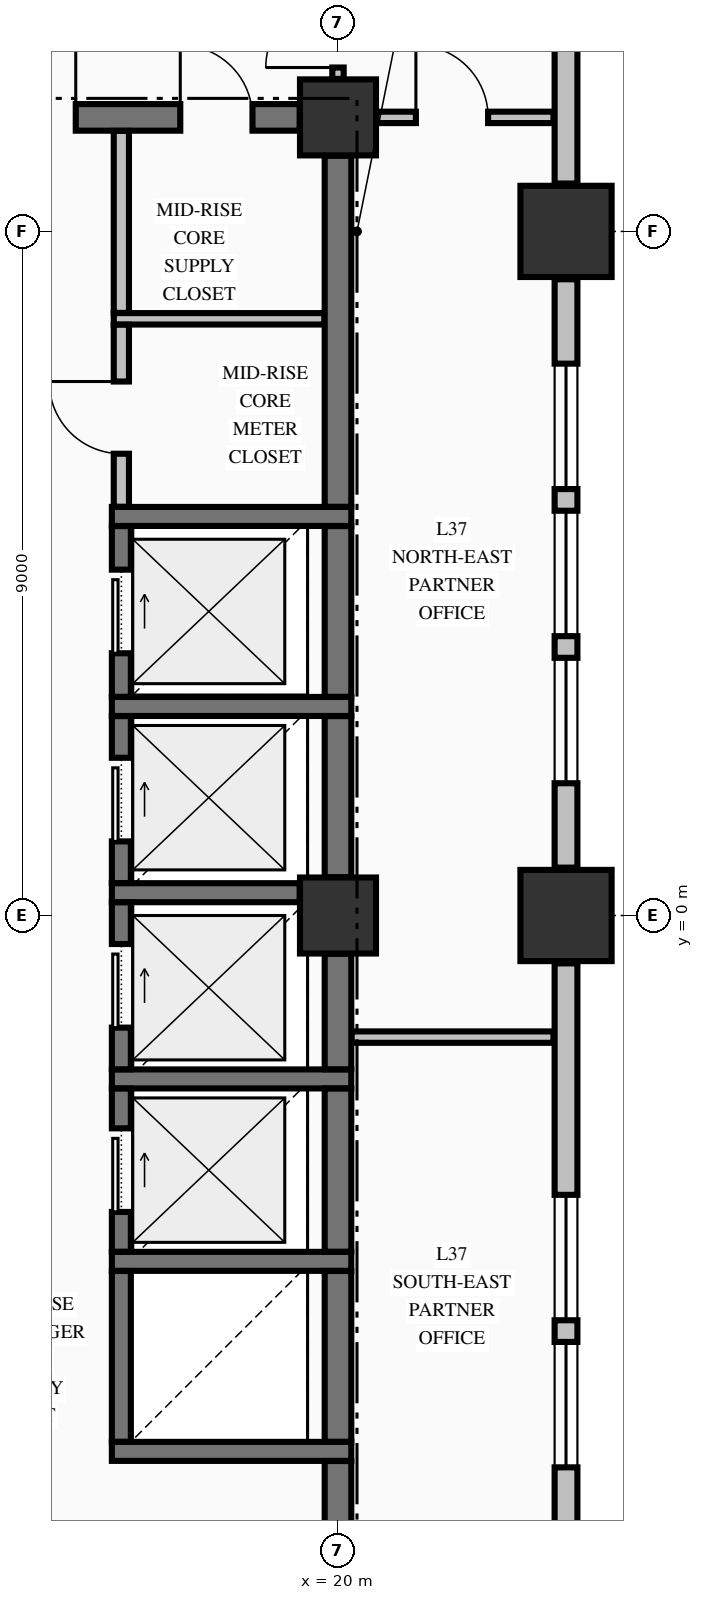
"""IFC4 building model, lengths in metres.
Left out: names, types, materials, properties, quantities, classifications, styles, units other than length and angle.
Written with IfcOpenShell. Run it as: python <this file> out.ifc"""

import sys

from ifc_helpers import new_model, si_unit, direction, frame, frame_2d, origin, origin_2d, place, context, subcontext, project, spatial, rectangle, extrude, element, fill, save


model = new_model("IFC4")
c1 = context("Model", 3, precision=1e-05, world=origin(), true_north=direction((0.0, 1.0)))
c2 = subcontext(c1, "Body", "Model", "MODEL_VIEW")
j1 = project(units=[si_unit("LENGTHUNIT", "METRE"), si_unit("PLANEANGLEUNIT", "RADIAN")], contexts=[c1])
p1 = place(None, origin())
s1 = spatial("IfcSite", under=j1, at=p1, CompositionType="ELEMENT")
p2 = place(p1, origin())
s2 = spatial("IfcBuilding", under=s1, at=p2, CompositionType="ELEMENT")
p3 = place(p2, frame((0.0, 0.0, 146.34)))
s3 = spatial("IfcBuildingStorey", under=s2, at=p3, CompositionType="ELEMENT", Elevation=146.34)
for number, where, z_axis, x_axis in (
    (1, (23.0, 0.0, -0.25), (0.0, 0.0, 1.0), (1.0, 0.0, 0.0)),
    (2, (23.0, 9.0, -0.25), (0.0, 0.0, 1.0), (1.0, 0.0, 0.0)),
):
    element("IfcColumn", number, at=place(p3, frame(where, z_axis=z_axis, x_axis=x_axis)), inside=s3, PredefinedType="COLUMN", context=c2, shape_type="SweptSolid", body=[
        extrude(rectangle(XDim=1.2, YDim=1.2, at=origin_2d()), origin(), (0.0, 0.0, 1.0), 3.57),
    ])
for number, where, z_axis, x_axis in (
    (3, (20.0, 10.5, -0.25), (0.0, 0.0, 1.0), (1.0, 0.0, 0.0)),
    (4, (20.0, 0.0, -0.25), (0.0, 0.0, 1.0), (1.0, 0.0, 0.0)),
):
    element("IfcColumn", number, at=place(p3, frame(where, z_axis=z_axis, x_axis=x_axis)), inside=s3, PredefinedType="COLUMN", context=c2, shape_type="SweptSolid", body=[
        extrude(rectangle(XDim=1.0, YDim=1.0, at=origin_2d()), origin(), (0.0, 0.0, 1.0), 3.57),
    ])
p4 = place(p3, frame((23.0, -8.37, 0.0), z_axis=(0.0, 0.0, 1.0), x_axis=(0.0, 1.0, 0.0)))
e5 = element("IfcWall", 5, at=p4, inside=s3, PredefinedType="STANDARD", context=c2, shape_type="SweptSolid", body=[
    extrude(rectangle(XDim=7.74, YDim=0.3, at=frame_2d((3.87, 0.0))), origin(), (0.0, 0.0, 1.0), 2.712),
])
p5 = place(p4, frame((1.11, 0.0, 0.8)))
e6 = element("IfcOpeningElement", 6, at=p5, cuts=e5, PredefinedType="OPENING", context=c2, shape_type="SweptSolid", body=[
    extrude(rectangle(XDim=1.65, YDim=1.7, at=frame_2d((0.825, 0.85))), frame((0.0, 0.16, 0.0), z_axis=(0.0, -1.0, 0.0), x_axis=(1.0, 0.0, 0.0)), (0.0, 0.0, 1.0), 0.32),
])
p6 = place(p4, frame((3.045, 0.0, 0.8)))
e7 = element("IfcOpeningElement", 7, at=p6, cuts=e5, PredefinedType="OPENING", context=c2, shape_type="SweptSolid", body=[
    extrude(rectangle(XDim=1.65, YDim=1.7, at=frame_2d((0.825, 0.85))), frame((0.0, 0.16, 0.0), z_axis=(0.0, -1.0, 0.0), x_axis=(1.0, 0.0, 0.0)), (0.0, 0.0, 1.0), 0.32),
])
p7 = place(p3, frame((23.0, 0.63, 0.0), z_axis=(0.0, 0.0, 1.0), x_axis=(0.0, 1.0, 0.0)))
e8 = element("IfcWall", 8, at=p7, inside=s3, PredefinedType="STANDARD", context=c2, shape_type="SweptSolid", body=[
    extrude(rectangle(XDim=7.74, YDim=0.3, at=frame_2d((3.87, 0.0))), origin(), (0.0, 0.0, 1.0), 2.712),
])
p8 = place(p7, frame((1.11, 0.0, 0.8)))
e9 = element("IfcOpeningElement", 9, at=p8, cuts=e8, PredefinedType="OPENING", context=c2, shape_type="SweptSolid", body=[
    extrude(rectangle(XDim=1.65, YDim=1.7, at=frame_2d((0.825, 0.85))), frame((0.0, 0.16, 0.0), z_axis=(0.0, -1.0, 0.0), x_axis=(1.0, 0.0, 0.0)), (0.0, 0.0, 1.0), 0.32),
])
p9 = place(p7, frame((3.045, 0.0, 0.8)))
e10 = element("IfcOpeningElement", 10, at=p9, cuts=e8, PredefinedType="OPENING", context=c2, shape_type="SweptSolid", body=[
    extrude(rectangle(XDim=1.65, YDim=1.7, at=frame_2d((0.825, 0.85))), frame((0.0, 0.16, 0.0), z_axis=(0.0, -1.0, 0.0), x_axis=(1.0, 0.0, 0.0)), (0.0, 0.0, 1.0), 0.32),
])
p10 = place(p7, frame((4.98, 0.0, 0.8)))
e11 = element("IfcOpeningElement", 11, at=p10, cuts=e8, PredefinedType="OPENING", context=c2, shape_type="SweptSolid", body=[
    extrude(rectangle(XDim=1.65, YDim=1.7, at=frame_2d((0.825, 0.85))), frame((0.0, 0.16, 0.0), z_axis=(0.0, -1.0, 0.0), x_axis=(1.0, 0.0, 0.0)), (0.0, 0.0, 1.0), 0.32),
])
p11 = place(p3, frame((23.0, 9.63, 0.0), z_axis=(0.0, 0.0, 1.0), x_axis=(0.0, 1.0, 0.0)))
e12 = element("IfcWall", 12, at=p11, inside=s3, PredefinedType="STANDARD", context=c2, shape_type="SweptSolid", body=[
    extrude(rectangle(XDim=10.74, YDim=0.3, at=frame_2d((5.37, 0.0))), origin(), (0.0, 0.0, 1.0), 2.712),
])
for number, where, z_axis, x_axis in (
    (13, (17.025, -7.05, 0.0), (0.0, 0.0, 1.0), (1.0, 0.0, 0.0)),
    (14, (17.025, -4.55, 0.0), (0.0, 0.0, 1.0), (1.0, 0.0, 0.0)),
    (15, (17.025, -2.15, 0.0), (0.0, 0.0, 1.0), (1.0, 0.0, 0.0)),
):
    element("IfcWall", number, at=place(p3, frame(where, z_axis=z_axis, x_axis=x_axis)), inside=s3, PredefinedType="SOLIDWALL", context=c2, shape_type="SweptSolid", body=[
        extrude(rectangle(XDim=3.15, YDim=0.25, at=frame_2d((1.575, 0.0))), origin(), (0.0, 0.0, 1.0), 3.32),
    ])
p12 = place(p3, frame((17.025, 0.3, 0.0), z_axis=(0.0, 0.0, 1.0), x_axis=(1.0, 0.0, 0.0)))
e16 = element("IfcWall", 16, at=p12, inside=s3, PredefinedType="SOLIDWALL", context=c2, shape_type="SweptSolid", body=[
    extrude(rectangle(XDim=2.471, YDim=0.25, at=frame_2d((1.236, 0.0))), origin(), (0.0, 0.0, 1.0), 3.32),
])
for number, where, z_axis, x_axis in (
    (17, (17.025, 2.75, 0.0), (0.0, 0.0, 1.0), (1.0, 0.0, 0.0)),
    (18, (17.025, 5.25, 0.0), (0.0, 0.0, 1.0), (1.0, 0.0, 0.0)),
):
    element("IfcWall", number, at=place(p3, frame(where, z_axis=z_axis, x_axis=x_axis)), inside=s3, PredefinedType="SOLIDWALL", context=c2, shape_type="SweptSolid", body=[
        extrude(rectangle(XDim=3.15, YDim=0.25, at=frame_2d((1.575, 0.0))), origin(), (0.0, 0.0, 1.0), 3.32),
    ])
p13 = place(p3, frame((14.7, 10.5, 0.0), z_axis=(0.0, 0.0, 1.0), x_axis=(1.0, 0.0, 0.0)))
e19 = element("IfcWall", 19, at=p13, inside=s3, PredefinedType="SHEAR", context=c2, shape_type="SweptSolid", body=[
    extrude(rectangle(XDim=4.796, YDim=0.35, at=frame_2d((2.398, 0.0))), origin(), (0.0, 0.0, 1.0), 3.32),
])
p14 = place(p13, frame((0.65, 0.0, 0.0)))
e20 = element("IfcOpeningElement", 20, at=p14, cuts=e19, PredefinedType="OPENING", context=c2, shape_type="SweptSolid", body=[
    extrude(rectangle(XDim=1.2, YDim=2.15, at=frame_2d((0.6, 1.075))), frame((0.0, 0.185, 0.0), z_axis=(0.0, -1.0, 0.0), x_axis=(1.0, 0.0, 0.0)), (0.0, 0.0, 1.0), 0.37),
])
p15 = place(p13, frame((3.225, 0.0, 0.0)))
e21 = element("IfcOpeningElement", 21, at=p15, cuts=e19, PredefinedType="OPENING", context=c2, shape_type="SweptSolid", body=[
    extrude(rectangle(XDim=0.95, YDim=2.15, at=frame_2d((0.475, 1.075))), frame((0.0, 0.185, 0.0), z_axis=(0.0, -1.0, 0.0), x_axis=(1.0, 0.0, 0.0)), (0.0, 0.0, 1.0), 0.37),
])
p16 = place(p3, frame((20.178, -1.6, 0.0), z_axis=(0.0, 0.0, 1.0), x_axis=(1.0, 0.0, 0.0)))
e22 = element("IfcWall", 22, at=p16, inside=s3, PredefinedType="PARTITIONING", context=c2, shape_type="SweptSolid", body=[
    extrude(rectangle(XDim=2.657, YDim=0.15, at=frame_2d((1.329, 0.0))), origin(), (0.0, 0.0, 1.0), 3.32),
])
p17 = place(p3, frame((17.05, 7.85, 0.0), z_axis=(0.0, 0.0, 1.0), x_axis=(1.0, 0.0, 0.0)))
e23 = element("IfcWall", 23, at=p17, inside=s3, PredefinedType="PARTITIONING", context=c2, shape_type="SweptSolid", body=[
    extrude(rectangle(XDim=2.772, YDim=0.15, at=frame_2d((1.386, 0.0))), origin(), (0.0, 0.0, 1.0), 3.32),
])
p18 = place(p3, frame((20.506, 10.5, 0.0), z_axis=(0.0, 0.0, 1.0), x_axis=(1.0, 0.0, 0.0)))
e24 = element("IfcWall", 24, at=p18, inside=s3, PredefinedType="PARTITIONING", context=c2, shape_type="SweptSolid", body=[
    extrude(rectangle(XDim=2.329, YDim=0.15, at=frame_2d((1.165, 0.0))), origin(), (0.0, 0.0, 1.0), 3.32),
])
p19 = place(p18, frame((0.519, 0.0, 0.0)))
e25 = element("IfcOpeningElement", 25, at=p19, cuts=e24, PredefinedType="OPENING", context=c2, shape_type="SweptSolid", body=[
    extrude(rectangle(XDim=0.95, YDim=2.15, at=frame_2d((0.475, 1.075))), frame((0.0, 0.085, 0.0), z_axis=(0.0, -1.0, 0.0), x_axis=(1.0, 0.0, 0.0)), (0.0, 0.0, 1.0), 0.17),
])
p20 = place(p3, frame((17.15, -6.923, 0.0), z_axis=(0.0, 0.0, 1.0), x_axis=(0.0, 1.0, 0.0)))
e26 = element("IfcWall", 26, at=p20, inside=s3, PredefinedType="SOLIDWALL", context=c2, shape_type="SweptSolid", body=[
    extrude(rectangle(XDim=2.246, YDim=0.25, at=frame_2d((1.123, 0.0))), origin(), (0.0, 0.0, 1.0), 3.32),
])
p21 = place(p3, frame((17.15, -4.423, 0.0), z_axis=(0.0, 0.0, 1.0), x_axis=(0.0, 1.0, 0.0)))
e27 = element("IfcWall", 27, at=p21, inside=s3, PredefinedType="SOLIDWALL", context=c2, shape_type="SweptSolid", body=[
    extrude(rectangle(XDim=2.146, YDim=0.25, at=frame_2d((1.073, 0.0))), origin(), (0.0, 0.0, 1.0), 3.32),
])
p22 = place(p21, frame((0.523, 0.0, 0.0)))
e28 = element("IfcOpeningElement", 28, at=p22, cuts=e27, PredefinedType="OPENING", context=c2, shape_type="SweptSolid", body=[
    extrude(rectangle(XDim=1.1, YDim=2.2, at=frame_2d((0.55, 1.1))), frame((0.0, 0.135, 0.0), z_axis=(0.0, -1.0, 0.0), x_axis=(1.0, 0.0, 0.0)), (0.0, 0.0, 1.0), 0.27),
])
p23 = place(p3, frame((17.15, -2.023, 0.0), z_axis=(0.0, 0.0, 1.0), x_axis=(0.0, 1.0, 0.0)))
e29 = element("IfcWall", 29, at=p23, inside=s3, PredefinedType="SOLIDWALL", context=c2, shape_type="SweptSolid", body=[
    extrude(rectangle(XDim=2.196, YDim=0.25, at=frame_2d((1.098, 0.0))), origin(), (0.0, 0.0, 1.0), 3.32),
])
p24 = place(p23, frame((0.548, 0.0, 0.0)))
e30 = element("IfcOpeningElement", 30, at=p24, cuts=e29, PredefinedType="OPENING", context=c2, shape_type="SweptSolid", body=[
    extrude(rectangle(XDim=1.1, YDim=2.2, at=frame_2d((0.55, 1.1))), frame((0.0, 0.135, 0.0), z_axis=(0.0, -1.0, 0.0), x_axis=(1.0, 0.0, 0.0)), (0.0, 0.0, 1.0), 0.27),
])
p25 = place(p3, frame((17.15, 0.427, 0.0), z_axis=(0.0, 0.0, 1.0), x_axis=(0.0, 1.0, 0.0)))
e31 = element("IfcWall", 31, at=p25, inside=s3, PredefinedType="SOLIDWALL", context=c2, shape_type="SweptSolid", body=[
    extrude(rectangle(XDim=2.196, YDim=0.25, at=frame_2d((1.098, 0.0))), origin(), (0.0, 0.0, 1.0), 3.32),
])
p26 = place(p25, frame((0.548, 0.0, 0.0)))
e32 = element("IfcOpeningElement", 32, at=p26, cuts=e31, PredefinedType="OPENING", context=c2, shape_type="SweptSolid", body=[
    extrude(rectangle(XDim=1.1, YDim=2.2, at=frame_2d((0.55, 1.1))), frame((0.0, 0.135, 0.0), z_axis=(0.0, -1.0, 0.0), x_axis=(1.0, 0.0, 0.0)), (0.0, 0.0, 1.0), 0.27),
])
p27 = place(p3, frame((17.15, 2.877, 0.0), z_axis=(0.0, 0.0, 1.0), x_axis=(0.0, 1.0, 0.0)))
e33 = element("IfcWall", 33, at=p27, inside=s3, PredefinedType="SOLIDWALL", context=c2, shape_type="SweptSolid", body=[
    extrude(rectangle(XDim=2.246, YDim=0.25, at=frame_2d((1.123, 0.0))), origin(), (0.0, 0.0, 1.0), 3.32),
])
p28 = place(p27, frame((0.573, 0.0, 0.0)))
e34 = element("IfcOpeningElement", 34, at=p28, cuts=e33, PredefinedType="OPENING", context=c2, shape_type="SweptSolid", body=[
    extrude(rectangle(XDim=1.1, YDim=2.2, at=frame_2d((0.55, 1.1))), frame((0.0, 0.135, 0.0), z_axis=(0.0, -1.0, 0.0), x_axis=(1.0, 0.0, 0.0)), (0.0, 0.0, 1.0), 0.27),
])
p29 = place(p3, frame((20.0, -9.446, 0.0), z_axis=(0.0, 0.0, 1.0), x_axis=(0.0, 1.0, 0.0)))
e35 = element("IfcWall", 35, at=p29, inside=s3, PredefinedType="SHEAR", context=c2, shape_type="SweptSolid", body=[
    extrude(rectangle(XDim=2.269, YDim=0.35, at=frame_2d((1.135, 0.0))), origin(), (0.0, 0.0, 1.0), 3.32),
])
p30 = place(p3, frame((20.0, -6.923, 0.0), z_axis=(0.0, 0.0, 1.0), x_axis=(0.0, 1.0, 0.0)))
e36 = element("IfcWall", 36, at=p30, inside=s3, PredefinedType="SHEAR", context=c2, shape_type="SweptSolid", body=[
    extrude(rectangle(XDim=2.246, YDim=0.35, at=frame_2d((1.123, 0.0))), origin(), (0.0, 0.0, 1.0), 3.32),
])
p31 = place(p3, frame((20.0, -4.423, 0.0), z_axis=(0.0, 0.0, 1.0), x_axis=(0.0, 1.0, 0.0)))
e37 = element("IfcWall", 37, at=p31, inside=s3, PredefinedType="SHEAR", context=c2, shape_type="SweptSolid", body=[
    extrude(rectangle(XDim=2.146, YDim=0.35, at=frame_2d((1.073, 0.0))), origin(), (0.0, 0.0, 1.0), 3.32),
])
p32 = place(p3, frame((20.0, -2.023, 0.0), z_axis=(0.0, 0.0, 1.0), x_axis=(0.0, 1.0, 0.0)))
e38 = element("IfcWall", 38, at=p32, inside=s3, PredefinedType="SHEAR", context=c2, shape_type="SweptSolid", body=[
    extrude(rectangle(XDim=1.519, YDim=0.35, at=frame_2d((0.76, 0.0))), origin(), (0.0, 0.0, 1.0), 3.32),
])
p33 = place(p3, frame((20.0, 0.504, 0.0), z_axis=(0.0, 0.0, 1.0), x_axis=(0.0, 1.0, 0.0)))
e39 = element("IfcWall", 39, at=p33, inside=s3, PredefinedType="SHEAR", context=c2, shape_type="SweptSolid", body=[
    extrude(rectangle(XDim=2.119, YDim=0.35, at=frame_2d((1.06, 0.0))), origin(), (0.0, 0.0, 1.0), 3.32),
])
p34 = place(p3, frame((20.0, 2.877, 0.0), z_axis=(0.0, 0.0, 1.0), x_axis=(0.0, 1.0, 0.0)))
e40 = element("IfcWall", 40, at=p34, inside=s3, PredefinedType="SHEAR", context=c2, shape_type="SweptSolid", body=[
    extrude(rectangle(XDim=2.246, YDim=0.35, at=frame_2d((1.123, 0.0))), origin(), (0.0, 0.0, 1.0), 3.32),
])
p35 = place(p3, frame((20.0, 5.377, 0.0), z_axis=(0.0, 0.0, 1.0), x_axis=(0.0, 1.0, 0.0)))
e41 = element("IfcWall", 41, at=p35, inside=s3, PredefinedType="SHEAR", context=c2, shape_type="SweptSolid", body=[
    extrude(rectangle(XDim=4.619, YDim=0.35, at=frame_2d((2.31, 0.0))), origin(), (0.0, 0.0, 1.0), 3.32),
])
p36 = place(p3, frame((17.15, 5.378, 0.0), z_axis=(0.0, 0.0, 1.0), x_axis=(0.0, 1.0, 0.0)))
e42 = element("IfcWall", 42, at=p36, inside=s3, PredefinedType="PARTITIONING", context=c2, shape_type="SweptSolid", body=[
    extrude(rectangle(XDim=2.394, YDim=0.2, at=frame_2d((1.197, 0.0))), origin(), (0.0, 0.0, 1.0), 3.32),
])
p37 = place(p36, frame((0.697, 0.0, 0.0)))
e43 = element("IfcOpeningElement", 43, at=p37, cuts=e42, PredefinedType="OPENING", context=c2, shape_type="SweptSolid", body=[
    extrude(rectangle(XDim=0.95, YDim=2.15, at=frame_2d((0.475, 1.075))), frame((0.0, 0.11, 0.0), z_axis=(0.0, -1.0, 0.0), x_axis=(1.0, 0.0, 0.0)), (0.0, 0.0, 1.0), 0.22),
])
p38 = place(p3, frame((17.15, 7.928, 0.0), z_axis=(0.0, 0.0, 1.0), x_axis=(0.0, 1.0, 0.0)))
e44 = element("IfcWall", 44, at=p38, inside=s3, PredefinedType="PARTITIONING", context=c2, shape_type="SweptSolid", body=[
    extrude(rectangle(XDim=2.394, YDim=0.2, at=frame_2d((1.197, 0.0))), origin(), (0.0, 0.0, 1.0), 3.32),
])
p39 = place(p3, frame((20.0, 11.006, 0.0), z_axis=(0.0, 0.0, 1.0), x_axis=(0.0, 1.0, 0.0)))
e45 = element("IfcWall", 45, at=p39, inside=s3, PredefinedType="PARTITIONING", context=c2, shape_type="SweptSolid", body=[
    extrude(rectangle(XDim=1.666, YDim=0.15, at=frame_2d((0.833, 0.0))), origin(), (0.0, 0.0, 1.0), 2.81),
])
p40 = place(p39, frame((0.15, 0.0, 0.0)))
e46 = element("IfcOpeningElement", 46, at=p40, cuts=e45, PredefinedType="OPENING", context=c2, shape_type="SweptSolid", body=[
    extrude(rectangle(XDim=0.95, YDim=2.15, at=frame_2d((0.475, 1.075))), frame((0.0, 0.085, 0.0), z_axis=(0.0, -1.0, 0.0), x_axis=(1.0, 0.0, 0.0)), (0.0, 0.0, 1.0), 0.17),
])
p41 = place(p5, origin())
e47 = element("IfcWindow", 47, at=p41, inside=s3, PartitioningType="SINGLE_PANEL", PredefinedType="WINDOW", context=c2, shape_type="SweptSolid", body=[
    extrude(rectangle(XDim=1.65, YDim=1.7, at=frame_2d((0.825, 0.85))), frame((0.0, 0.03, 0.0), z_axis=(0.0, -1.0, 0.0), x_axis=(1.0, 0.0, 0.0)), (0.0, 0.0, 1.0), 0.06),
])
fill(e6, e47)
p42 = place(p6, origin())
e48 = element("IfcWindow", 48, at=p42, inside=s3, PartitioningType="SINGLE_PANEL", PredefinedType="WINDOW", context=c2, shape_type="SweptSolid", body=[
    extrude(rectangle(XDim=1.65, YDim=1.7, at=frame_2d((0.825, 0.85))), frame((0.0, 0.03, 0.0), z_axis=(0.0, -1.0, 0.0), x_axis=(1.0, 0.0, 0.0)), (0.0, 0.0, 1.0), 0.06),
])
fill(e7, e48)
p43 = place(p8, origin())
e49 = element("IfcWindow", 49, at=p43, inside=s3, PartitioningType="SINGLE_PANEL", PredefinedType="WINDOW", context=c2, shape_type="SweptSolid", body=[
    extrude(rectangle(XDim=1.65, YDim=1.7, at=frame_2d((0.825, 0.85))), frame((0.0, 0.03, 0.0), z_axis=(0.0, -1.0, 0.0), x_axis=(1.0, 0.0, 0.0)), (0.0, 0.0, 1.0), 0.06),
])
fill(e9, e49)
p44 = place(p9, origin())
e50 = element("IfcWindow", 50, at=p44, inside=s3, PartitioningType="SINGLE_PANEL", PredefinedType="WINDOW", context=c2, shape_type="SweptSolid", body=[
    extrude(rectangle(XDim=1.65, YDim=1.7, at=frame_2d((0.825, 0.85))), frame((0.0, 0.03, 0.0), z_axis=(0.0, -1.0, 0.0), x_axis=(1.0, 0.0, 0.0)), (0.0, 0.0, 1.0), 0.06),
])
fill(e10, e50)
p45 = place(p10, origin())
e51 = element("IfcWindow", 51, at=p45, inside=s3, PartitioningType="SINGLE_PANEL", PredefinedType="WINDOW", context=c2, shape_type="SweptSolid", body=[
    extrude(rectangle(XDim=1.65, YDim=1.7, at=frame_2d((0.825, 0.85))), frame((0.0, 0.03, 0.0), z_axis=(0.0, -1.0, 0.0), x_axis=(1.0, 0.0, 0.0)), (0.0, 0.0, 1.0), 0.06),
])
fill(e11, e51)
p46 = place(p22, origin())
e52 = element("IfcDoor", 52, at=p46, inside=s3, OperationType="SLIDING_TO_RIGHT", PredefinedType="DOOR", context=c2, shape_type="SweptSolid", body=[
    extrude(rectangle(XDim=1.1, YDim=2.2, at=frame_2d((0.55, 1.1))), frame((0.0, 0.025, 0.0), z_axis=(0.0, -1.0, 0.0), x_axis=(1.0, 0.0, 0.0)), (0.0, 0.0, 1.0), 0.05),
])
fill(e28, e52)
p47 = place(p24, origin())
e53 = element("IfcDoor", 53, at=p47, inside=s3, OperationType="SLIDING_TO_RIGHT", PredefinedType="DOOR", context=c2, shape_type="SweptSolid", body=[
    extrude(rectangle(XDim=1.1, YDim=2.2, at=frame_2d((0.55, 1.1))), frame((0.0, 0.025, 0.0), z_axis=(0.0, -1.0, 0.0), x_axis=(1.0, 0.0, 0.0)), (0.0, 0.0, 1.0), 0.05),
])
fill(e30, e53)
p48 = place(p26, origin())
e54 = element("IfcDoor", 54, at=p48, inside=s3, OperationType="SLIDING_TO_RIGHT", PredefinedType="DOOR", context=c2, shape_type="SweptSolid", body=[
    extrude(rectangle(XDim=1.1, YDim=2.2, at=frame_2d((0.55, 1.1))), frame((0.0, 0.025, 0.0), z_axis=(0.0, -1.0, 0.0), x_axis=(1.0, 0.0, 0.0)), (0.0, 0.0, 1.0), 0.05),
])
fill(e32, e54)
p49 = place(p28, origin())
e55 = element("IfcDoor", 55, at=p49, inside=s3, OperationType="SLIDING_TO_RIGHT", PredefinedType="DOOR", context=c2, shape_type="SweptSolid", body=[
    extrude(rectangle(XDim=1.1, YDim=2.2, at=frame_2d((0.55, 1.1))), frame((0.0, 0.025, 0.0), z_axis=(0.0, -1.0, 0.0), x_axis=(1.0, 0.0, 0.0)), (0.0, 0.0, 1.0), 0.05),
])
fill(e34, e55)
p50 = place(p14, origin())
e56 = element("IfcDoor", 56, at=p50, inside=s3, OperationType="SINGLE_SWING_RIGHT", PredefinedType="DOOR", context=c2, shape_type="SweptSolid", body=[
    extrude(rectangle(XDim=1.2, YDim=2.15, at=frame_2d((0.6, 1.075))), frame((0.0, 0.025, 0.0), z_axis=(0.0, -1.0, 0.0), x_axis=(1.0, 0.0, 0.0)), (0.0, 0.0, 1.0), 0.05),
])
fill(e20, e56)
p51 = place(p15, origin())
e57 = element("IfcDoor", 57, at=p51, inside=s3, OperationType="SINGLE_SWING_LEFT", PredefinedType="DOOR", context=c2, shape_type="SweptSolid", body=[
    extrude(rectangle(XDim=0.95, YDim=2.15, at=frame_2d((0.475, 1.075))), frame((0.0, 0.025, 0.0), z_axis=(0.0, -1.0, 0.0), x_axis=(1.0, 0.0, 0.0)), (0.0, 0.0, 1.0), 0.05),
])
fill(e21, e57)
p52 = place(p37, origin())
e58 = element("IfcDoor", 58, at=p52, inside=s3, OperationType="SINGLE_SWING_RIGHT", PredefinedType="DOOR", context=c2, shape_type="SweptSolid", body=[
    extrude(rectangle(XDim=0.95, YDim=2.15, at=frame_2d((0.475, 1.075))), frame((0.0, 0.025, 0.0), z_axis=(0.0, -1.0, 0.0), x_axis=(1.0, 0.0, 0.0)), (0.0, 0.0, 1.0), 0.05),
])
fill(e43, e58)
p53 = place(p40, origin())
e59 = element("IfcDoor", 59, at=p53, inside=s3, OperationType="SINGLE_SWING_LEFT", PredefinedType="DOOR", context=c2, shape_type="SweptSolid", body=[
    extrude(rectangle(XDim=0.95, YDim=2.15, at=frame_2d((0.475, 1.075))), frame((0.0, 0.025, 0.0), z_axis=(0.0, -1.0, 0.0), x_axis=(1.0, 0.0, 0.0)), (0.0, 0.0, 1.0), 0.05),
])
fill(e46, e59)
p54 = place(p19, origin())
e60 = element("IfcDoor", 60, at=p54, inside=s3, OperationType="SINGLE_SWING_LEFT", PredefinedType="DOOR", context=c2, shape_type="SweptSolid", body=[
    extrude(rectangle(XDim=0.95, YDim=2.15, at=frame_2d((0.475, 1.075))), frame((0.0, 0.025, 0.0), z_axis=(0.0, -1.0, 0.0), x_axis=(1.0, 0.0, 0.0)), (0.0, 0.0, 1.0), 0.05),
])
fill(e25, e60)
save(model, sys.argv[1])
